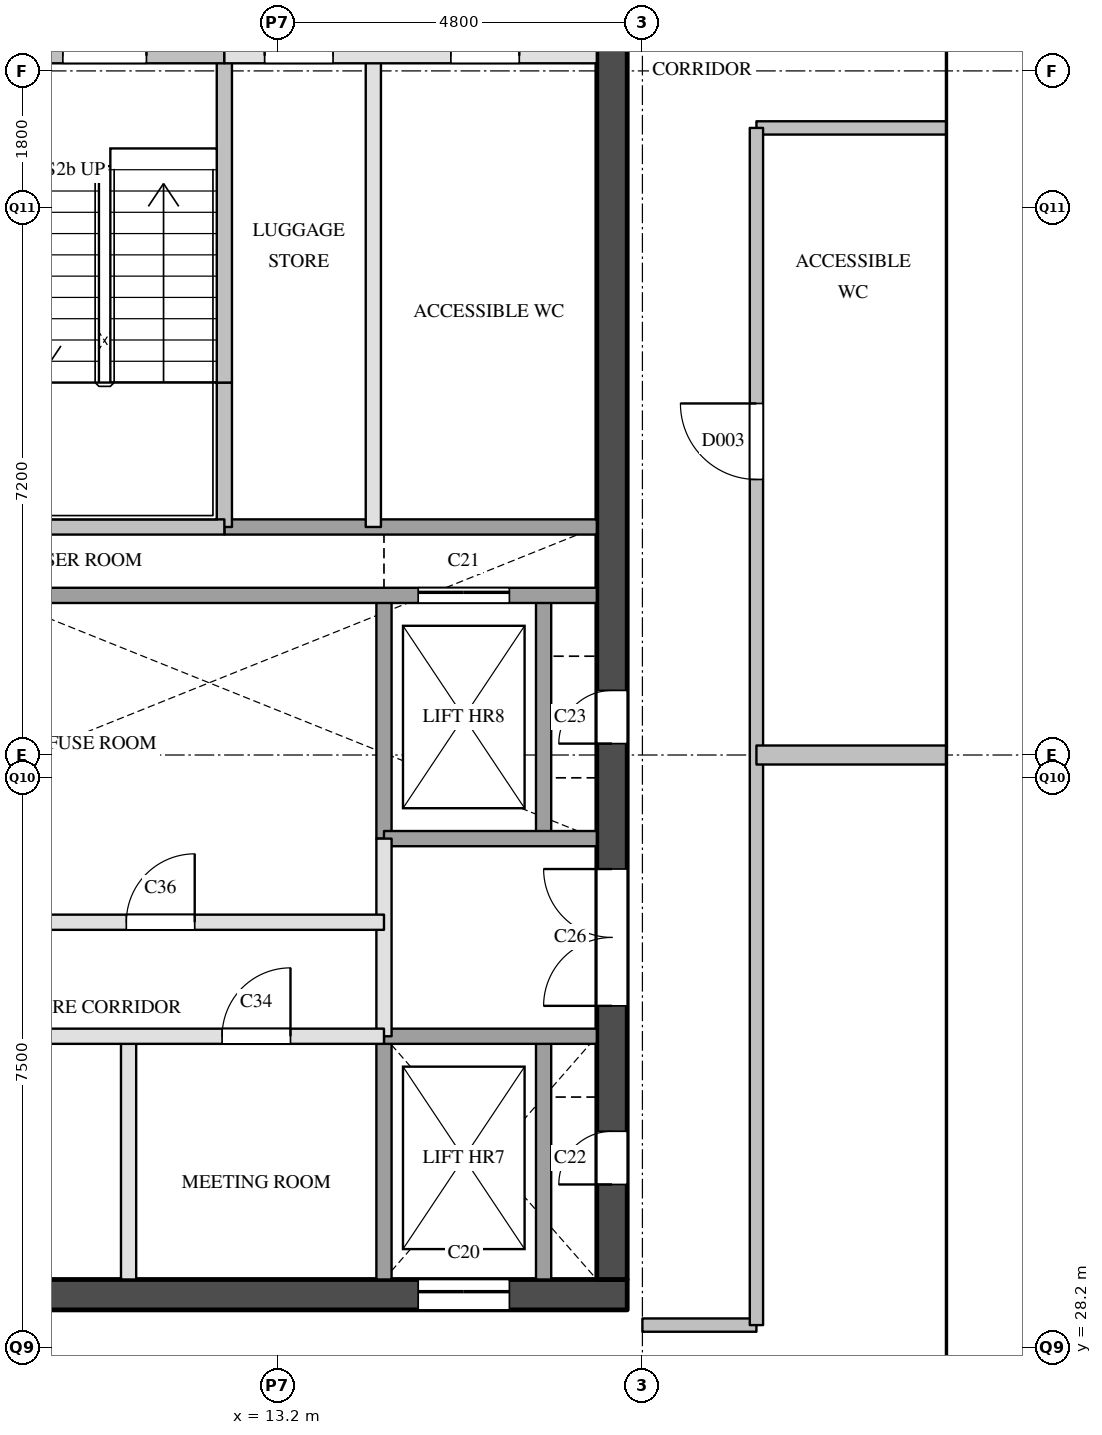
"""IFC4 building model, lengths in metres.
Left out: names, types, materials, properties, quantities, classifications, styles, units other than length and angle.
Written with IfcOpenShell. Run it as: python <this file> out.ifc"""

import sys

from ifc_helpers import new_model, si_unit, direction, frame, frame_2d, origin, place, context, subcontext, project, spatial, rectangle, extrude, element, fill, save


model = new_model("IFC4")
c1 = context("Model", 3, precision=1e-05, world=origin(), true_north=direction((0.0, 1.0)))
c2 = subcontext(c1, "Body", "Model", "MODEL_VIEW")
j1 = project(units=[si_unit("LENGTHUNIT", "METRE"), si_unit("PLANEANGLEUNIT", "RADIAN")], contexts=[c1])
p1 = place(None, origin())
s1 = spatial("IfcSite", under=j1, at=p1, CompositionType="ELEMENT")
p2 = place(p1, origin())
s2 = spatial("IfcBuilding", under=s1, at=p2, CompositionType="ELEMENT")
p3 = place(p2, frame((0.0, 0.0, 215.0)))
s3 = spatial("IfcBuildingStorey", under=s2, at=p3, CompositionType="ELEMENT", Elevation=215.0)
p4 = place(p3, frame((5.8, 28.9, 0.0), z_axis=(0.0, 0.0, 1.0), x_axis=(1.0, 0.0, 0.0)))
e1 = element("IfcWall", 1, at=p4, inside=s3, PredefinedType="SHEAR", context=c2, shape_type="SweptSolid", body=[
    extrude(rectangle(XDim=12.0, YDim=0.4, at=frame_2d((6.0, 0.0))), origin(), (0.0, 0.0, 1.0), 3.6),
])
p5 = place(p4, frame((9.25, 0.0, 0.0)))
e2 = element("IfcOpeningElement", 2, at=p5, cuts=e1, PredefinedType="OPENING", context=c2, shape_type="SweptSolid", body=[
    extrude(rectangle(XDim=1.2, YDim=2.1, at=frame_2d((0.6, 1.05))), frame((0.0, 0.21, 0.0), z_axis=(0.0, -1.0, 0.0), x_axis=(1.0, 0.0, 0.0)), (0.0, 0.0, 1.0), 0.42),
])
p6 = place(p3, frame((17.6, 29.1, 0.0), z_axis=(0.0, 0.0, 1.0), x_axis=(0.0, 1.0, 0.0)))
e3 = element("IfcWall", 3, at=p6, inside=s3, PredefinedType="SHEAR", context=c2, shape_type="SweptSolid", body=[
    extrude(rectangle(XDim=20.3, YDim=0.4, at=frame_2d((10.15, 0.0))), origin(), (0.0, 0.0, 1.0), 3.6),
])
p7 = place(p6, frame((1.25, 0.0, 0.0)))
e4 = element("IfcOpeningElement", 4, at=p7, cuts=e3, PredefinedType="OPENING", context=c2, shape_type="SweptSolid", body=[
    extrude(rectangle(XDim=0.7, YDim=2.1, at=frame_2d((0.35, 1.05))), frame((0.0, 0.21, 0.0), z_axis=(0.0, -1.0, 0.0), x_axis=(1.0, 0.0, 0.0)), (0.0, 0.0, 1.0), 0.42),
])
p8 = place(p6, frame((7.05, 0.0, 0.0)))
e5 = element("IfcOpeningElement", 5, at=p8, cuts=e3, PredefinedType="OPENING", context=c2, shape_type="SweptSolid", body=[
    extrude(rectangle(XDim=0.7, YDim=2.1, at=frame_2d((0.35, 1.05))), frame((0.0, 0.21, 0.0), z_axis=(0.0, -1.0, 0.0), x_axis=(1.0, 0.0, 0.0)), (0.0, 0.0, 1.0), 0.42),
])
p9 = place(p6, frame((3.6, 0.0, 0.0)))
e6 = element("IfcOpeningElement", 6, at=p9, cuts=e3, PredefinedType="OPENING", context=c2, shape_type="SweptSolid", body=[
    extrude(rectangle(XDim=1.8, YDim=2.1, at=frame_2d((0.9, 1.05))), frame((0.0, 0.21, 0.0), z_axis=(0.0, -1.0, 0.0), x_axis=(1.0, 0.0, 0.0)), (0.0, 0.0, 1.0), 0.42),
])
p10 = place(p3, frame((11.24, 29.1, 0.0), z_axis=(0.0, 0.0, 1.0), x_axis=(0.0, 1.0, 0.0)))
e7 = element("IfcWall", 7, at=p10, inside=s3, PredefinedType="PARTITIONING", context=c2, shape_type="SweptSolid", body=[
    extrude(rectangle(XDim=3.2, YDim=0.2, at=frame_2d((1.6, 0.0))), origin(), (0.0, 0.0, 1.0), 3.6),
])
p11 = place(p3, frame((12.5, 39.0, 0.0), z_axis=(0.0, 0.0, 1.0), x_axis=(0.0, 1.0, 0.0)))
e8 = element("IfcWall", 8, at=p11, inside=s3, PredefinedType="SOLIDWALL", context=c2, shape_type="SweptSolid", body=[
    extrude(rectangle(XDim=1.9, YDim=0.2, at=frame_2d((0.95, 0.0))), origin(), (0.0, 0.0, 1.0), 3.6),
])
p12 = place(p3, frame((12.5, 40.9, 0.0), z_axis=(0.0, 0.0, 1.0), x_axis=(0.0, 1.0, 0.0)))
e9 = element("IfcWall", 9, at=p12, inside=s3, PredefinedType="SOLIDWALL", context=c2, shape_type="SweptSolid", body=[
    extrude(rectangle(XDim=4.3, YDim=0.2, at=frame_2d((2.15, 0.0))), origin(), (0.0, 0.0, 1.0), 3.6),
])
p13 = place(p3, frame((14.46, 39.0, 0.0), z_axis=(0.0, 0.0, 1.0), x_axis=(0.0, 1.0, 0.0)))
e10 = element("IfcWall", 10, at=p13, inside=s3, PredefinedType="PARTITIONING", context=c2, shape_type="SweptSolid", body=[
    extrude(rectangle(XDim=6.2, YDim=0.2, at=frame_2d((3.1, 0.0))), origin(), (0.0, 0.0, 1.0), 3.6),
])
p14 = place(p3, frame((14.6, 32.3, 0.0), z_axis=(0.0, 0.0, 1.0), x_axis=(0.0, 1.0, 0.0)))
e11 = element("IfcWall", 11, at=p14, inside=s3, PredefinedType="PARTITIONING", context=c2, shape_type="SweptSolid", body=[
    extrude(rectangle(XDim=2.6, YDim=0.2, at=frame_2d((1.3, 0.0))), origin(), (0.0, 0.0, 1.0), 3.6),
])
p15 = place(p3, frame((14.6, 29.1, 0.0), z_axis=(0.0, 0.0, 1.0), x_axis=(0.0, 1.0, 0.0)))
e12 = element("IfcWall", 12, at=p15, inside=s3, PredefinedType="SOLIDWALL", context=c2, shape_type="SweptSolid", body=[
    extrude(rectangle(XDim=3.2, YDim=0.2, at=frame_2d((1.6, 0.0))), origin(), (0.0, 0.0, 1.0), 3.6),
])
p16 = place(p3, frame((14.6, 34.9, 0.0), z_axis=(0.0, 0.0, 1.0), x_axis=(0.0, 1.0, 0.0)))
e13 = element("IfcWall", 13, at=p16, inside=s3, PredefinedType="SOLIDWALL", context=c2, shape_type="SweptSolid", body=[
    extrude(rectangle(XDim=3.2, YDim=0.2, at=frame_2d((1.6, 0.0))), origin(), (0.0, 0.0, 1.0), 3.6),
])
p17 = place(p3, frame((16.7, 29.1, 0.0), z_axis=(0.0, 0.0, 1.0), x_axis=(0.0, 1.0, 0.0)))
e14 = element("IfcWall", 14, at=p17, inside=s3, PredefinedType="SOLIDWALL", context=c2, shape_type="SweptSolid", body=[
    extrude(rectangle(XDim=3.2, YDim=0.2, at=frame_2d((1.6, 0.0))), origin(), (0.0, 0.0, 1.0), 3.6),
])
p18 = place(p3, frame((16.7, 34.9, 0.0), z_axis=(0.0, 0.0, 1.0), x_axis=(0.0, 1.0, 0.0)))
e15 = element("IfcWall", 15, at=p18, inside=s3, PredefinedType="SOLIDWALL", context=c2, shape_type="SweptSolid", body=[
    extrude(rectangle(XDim=3.2, YDim=0.2, at=frame_2d((1.6, 0.0))), origin(), (0.0, 0.0, 1.0), 3.6),
])
p19 = place(p3, frame((6.2, 32.3, 0.0), z_axis=(0.0, 0.0, 1.0), x_axis=(1.0, 0.0, 0.0)))
e16 = element("IfcWall", 16, at=p19, inside=s3, PredefinedType="PARTITIONING", context=c2, shape_type="SweptSolid", body=[
    extrude(rectangle(XDim=8.4, YDim=0.2, at=frame_2d((4.2, 0.0))), origin(), (0.0, 0.0, 1.0), 3.6),
])
p20 = place(p19, frame((2.07, 0.0, 0.0)))
e17 = element("IfcOpeningElement", 17, at=p20, cuts=e16, PredefinedType="OPENING", context=c2, shape_type="SweptSolid", body=[
    extrude(rectangle(XDim=0.9, YDim=2.1, at=frame_2d((0.45, 1.05))), frame((0.0, 0.11, 0.0), z_axis=(0.0, -1.0, 0.0), x_axis=(1.0, 0.0, 0.0)), (0.0, 0.0, 1.0), 0.22),
])
p21 = place(p19, frame((6.27, 0.0, 0.0)))
e18 = element("IfcOpeningElement", 18, at=p21, cuts=e16, PredefinedType="OPENING", context=c2, shape_type="SweptSolid", body=[
    extrude(rectangle(XDim=0.9, YDim=2.1, at=frame_2d((0.45, 1.05))), frame((0.0, 0.11, 0.0), z_axis=(0.0, -1.0, 0.0), x_axis=(1.0, 0.0, 0.0)), (0.0, 0.0, 1.0), 0.22),
])
p22 = place(p3, frame((14.6, 32.3, 0.0), z_axis=(0.0, 0.0, 1.0), x_axis=(1.0, 0.0, 0.0)))
e19 = element("IfcWall", 19, at=p22, inside=s3, PredefinedType="SOLIDWALL", context=c2, shape_type="SweptSolid", body=[
    extrude(rectangle(XDim=2.8, YDim=0.2, at=frame_2d((1.4, 0.0))), origin(), (0.0, 0.0, 1.0), 3.6),
])
p23 = place(p3, frame((6.2, 33.8, 0.0), z_axis=(0.0, 0.0, 1.0), x_axis=(1.0, 0.0, 0.0)))
e20 = element("IfcWall", 20, at=p23, inside=s3, PredefinedType="PARTITIONING", context=c2, shape_type="SweptSolid", body=[
    extrude(rectangle(XDim=8.4, YDim=0.2, at=frame_2d((4.2, 0.0))), origin(), (0.0, 0.0, 1.0), 3.6),
])
p24 = place(p23, frame((0.81, 0.0, 0.0)))
e21 = element("IfcOpeningElement", 21, at=p24, cuts=e20, PredefinedType="OPENING", context=c2, shape_type="SweptSolid", body=[
    extrude(rectangle(XDim=0.9, YDim=2.1, at=frame_2d((0.45, 1.05))), frame((0.0, 0.11, 0.0), z_axis=(0.0, -1.0, 0.0), x_axis=(1.0, 0.0, 0.0)), (0.0, 0.0, 1.0), 0.22),
])
p25 = place(p23, frame((5.01, 0.0, 0.0)))
e22 = element("IfcOpeningElement", 22, at=p25, cuts=e20, PredefinedType="OPENING", context=c2, shape_type="SweptSolid", body=[
    extrude(rectangle(XDim=0.9, YDim=2.1, at=frame_2d((0.45, 1.05))), frame((0.0, 0.11, 0.0), z_axis=(0.0, -1.0, 0.0), x_axis=(1.0, 0.0, 0.0)), (0.0, 0.0, 1.0), 0.22),
])
p26 = place(p3, frame((14.6, 34.9, 0.0), z_axis=(0.0, 0.0, 1.0), x_axis=(1.0, 0.0, 0.0)))
e23 = element("IfcWall", 23, at=p26, inside=s3, PredefinedType="SOLIDWALL", context=c2, shape_type="SweptSolid", body=[
    extrude(rectangle(XDim=2.8, YDim=0.2, at=frame_2d((1.4, 0.0))), origin(), (0.0, 0.0, 1.0), 3.6),
])
p27 = place(p3, frame((6.2, 38.1, 0.0), z_axis=(0.0, 0.0, 1.0), x_axis=(1.0, 0.0, 0.0)))
e24 = element("IfcWall", 24, at=p27, inside=s3, PredefinedType="SOLIDWALL", context=c2, shape_type="SweptSolid", body=[
    extrude(rectangle(XDim=11.2, YDim=0.2, at=frame_2d((5.6, 0.0))), origin(), (0.0, 0.0, 1.0), 3.6),
])
p28 = place(p27, frame((8.85, 0.0, 0.0)))
e25 = element("IfcOpeningElement", 25, at=p28, cuts=e24, PredefinedType="OPENING", context=c2, shape_type="SweptSolid", body=[
    extrude(rectangle(XDim=1.2, YDim=2.1, at=frame_2d((0.6, 1.05))), frame((0.0, 0.11, 0.0), z_axis=(0.0, -1.0, 0.0), x_axis=(1.0, 0.0, 0.0)), (0.0, 0.0, 1.0), 0.22),
])
p29 = place(p3, frame((12.5, 39.0, 0.0), z_axis=(0.0, 0.0, 1.0), x_axis=(1.0, 0.0, 0.0)))
e26 = element("IfcWall", 26, at=p29, inside=s3, PredefinedType="SOLIDWALL", context=c2, shape_type="SweptSolid", body=[
    extrude(rectangle(XDim=4.9, YDim=0.2, at=frame_2d((2.45, 0.0))), origin(), (0.0, 0.0, 1.0), 3.6),
])
p30 = place(p3, frame((9.45, 39.0, 0.0), z_axis=(0.0, 0.0, 1.0), x_axis=(1.0, 0.0, 0.0)))
e27 = element("IfcWall", 27, at=p30, inside=s3, PredefinedType="SOLIDWALL", context=c2, shape_type="SweptSolid", body=[
    extrude(rectangle(XDim=3.05, YDim=0.2, at=frame_2d((1.525, 0.0))), origin(), (0.0, 0.0, 1.0), 3.6),
])
p31 = place(p3, frame((12.5, 45.2, 0.0), z_axis=(0.0, 0.0, 1.0), x_axis=(1.0, 0.0, 0.0)))
e28 = element("IfcWall", 28, at=p31, inside=s3, PredefinedType="PARTITIONING", context=c2, shape_type="SweptSolid", body=[
    extrude(rectangle(XDim=4.9, YDim=0.2, at=frame_2d((2.45, 0.0))), origin(), (0.0, 0.0, 1.0), 3.6),
])
p32 = place(p31, frame((0.53, 0.0, 0.0)))
e29 = element("IfcOpeningElement", 29, at=p32, cuts=e28, PredefinedType="OPENING", context=c2, shape_type="SweptSolid", body=[
    extrude(rectangle(XDim=0.9, YDim=2.1, at=frame_2d((0.45, 1.05))), frame((0.0, 0.11, 0.0), z_axis=(0.0, -1.0, 0.0), x_axis=(1.0, 0.0, 0.0)), (0.0, 0.0, 1.0), 0.22),
])
p33 = place(p31, frame((2.98, 0.0, 0.0)))
e30 = element("IfcOpeningElement", 30, at=p33, cuts=e28, PredefinedType="OPENING", context=c2, shape_type="SweptSolid", body=[
    extrude(rectangle(XDim=0.9, YDim=2.1, at=frame_2d((0.45, 1.05))), frame((0.0, 0.11, 0.0), z_axis=(0.0, -1.0, 0.0), x_axis=(1.0, 0.0, 0.0)), (0.0, 0.0, 1.0), 0.22),
])
p34 = place(p3, frame((6.2, 45.2, 0.0), z_axis=(0.0, 0.0, 1.0), x_axis=(1.0, 0.0, 0.0)))
e31 = element("IfcWall", 31, at=p34, inside=s3, PredefinedType="SOLIDWALL", context=c2, shape_type="SweptSolid", body=[
    extrude(rectangle(XDim=6.3, YDim=0.2, at=frame_2d((3.15, 0.0))), origin(), (0.0, 0.0, 1.0), 3.6),
])
p35 = place(p34, frame((1.025, 0.0, 0.0)))
e32 = element("IfcOpeningElement", 32, at=p35, cuts=e31, PredefinedType="OPENING", context=c2, shape_type="SweptSolid", body=[
    extrude(rectangle(XDim=1.1, YDim=2.1, at=frame_2d((0.55, 1.05))), frame((0.0, 0.11, 0.0), z_axis=(0.0, -1.0, 0.0), x_axis=(1.0, 0.0, 0.0)), (0.0, 0.0, 1.0), 0.22),
])
p36 = place(p34, frame((4.175, 0.0, 0.0)))
e33 = element("IfcOpeningElement", 33, at=p36, cuts=e31, PredefinedType="OPENING", context=c2, shape_type="SweptSolid", body=[
    extrude(rectangle(XDim=1.1, YDim=2.1, at=frame_2d((0.55, 1.05))), frame((0.0, 0.11, 0.0), z_axis=(0.0, -1.0, 0.0), x_axis=(1.0, 0.0, 0.0)), (0.0, 0.0, 1.0), 0.22),
])
p37 = place(p3, frame((18.0, 28.5, 0.0), z_axis=(0.0, 0.0, 1.0), x_axis=(1.0, 0.0, 0.0)))
e34 = element("IfcWall", 34, at=p37, inside=s3, PredefinedType="PARTITIONING", context=c2, shape_type="SweptSolid", body=[
    extrude(rectangle(XDim=1.5, YDim=0.175, at=frame_2d((0.75, 0.0))), origin(), (0.0, 0.0, 1.0), 3.6),
])
p38 = place(p3, frame((19.5, 44.25, 0.0), z_axis=(0.0, 0.0, 1.0), x_axis=(1.0, 0.0, 0.0)))
e35 = element("IfcWall", 35, at=p38, inside=s3, PredefinedType="PARTITIONING", context=c2, shape_type="SweptSolid", body=[
    extrude(rectangle(XDim=2.5, YDim=0.175, at=frame_2d((1.25, 0.0))), origin(), (0.0, 0.0, 1.0), 3.6),
])
p39 = place(p3, frame((19.5, 28.5, 0.0), z_axis=(0.0, 0.0, 1.0), x_axis=(0.0, 1.0, 0.0)))
e36 = element("IfcWall", 36, at=p39, inside=s3, PredefinedType="PARTITIONING", context=c2, shape_type="SweptSolid", body=[
    extrude(rectangle(XDim=15.75, YDim=0.175, at=frame_2d((7.875, 0.0))), origin(), (0.0, 0.0, 1.0), 3.6),
])
p40 = place(p39, frame((11.125, 0.0, 0.0)))
e37 = element("IfcOpeningElement", 37, at=p40, cuts=e36, PredefinedType="OPENING", context=c2, shape_type="SweptSolid", body=[
    extrude(rectangle(XDim=1.0, YDim=2.1, at=frame_2d((0.5, 1.05))), frame((0.0, 0.097, 0.0), z_axis=(0.0, -1.0, 0.0), x_axis=(1.0, 0.0, 0.0)), (0.0, 0.0, 1.0), 0.195),
])
p41 = place(p3, frame((19.5, 36.0, 0.0), z_axis=(0.0, 0.0, 1.0), x_axis=(1.0, 0.0, 0.0)))
e38 = element("IfcWall", 38, at=p41, inside=s3, PredefinedType="PARTITIONING", context=c2, shape_type="SweptSolid", body=[
    extrude(rectangle(XDim=2.5, YDim=0.25, at=frame_2d((1.25, 0.0))), origin(), (0.0, 0.0, 1.0), 3.6),
])
p42 = place(p5, origin())
e39 = element("IfcDoor", 39, at=p42, inside=s3, OperationType="SLIDING_TO_LEFT", PredefinedType="DOOR", context=c2, shape_type="SweptSolid", body=[
    extrude(rectangle(XDim=1.2, YDim=2.1, at=frame_2d((0.6, 1.05))), frame((0.0, 0.025, 0.0), z_axis=(0.0, -1.0, 0.0), x_axis=(1.0, 0.0, 0.0)), (0.0, 0.0, 1.0), 0.05),
])
fill(e2, e39)
p43 = place(p28, origin())
e40 = element("IfcDoor", 40, at=p43, inside=s3, OperationType="SLIDING_TO_LEFT", PredefinedType="DOOR", context=c2, shape_type="SweptSolid", body=[
    extrude(rectangle(XDim=1.2, YDim=2.1, at=frame_2d((0.6, 1.05))), frame((0.0, 0.025, 0.0), z_axis=(0.0, -1.0, 0.0), x_axis=(1.0, 0.0, 0.0)), (0.0, 0.0, 1.0), 0.05),
])
fill(e25, e40)
p44 = place(p7, origin())
e41 = element("IfcDoor", 41, at=p44, inside=s3, OperationType="SINGLE_SWING_LEFT", PredefinedType="DOOR", context=c2, shape_type="SweptSolid", body=[
    extrude(rectangle(XDim=0.7, YDim=2.1, at=frame_2d((0.35, 1.05))), frame((0.0, 0.025, 0.0), z_axis=(0.0, -1.0, 0.0), x_axis=(1.0, 0.0, 0.0)), (0.0, 0.0, 1.0), 0.05),
])
fill(e4, e41)
p45 = place(p8, origin())
e42 = element("IfcDoor", 42, at=p45, inside=s3, OperationType="SINGLE_SWING_LEFT", PredefinedType="DOOR", context=c2, shape_type="SweptSolid", body=[
    extrude(rectangle(XDim=0.7, YDim=2.1, at=frame_2d((0.35, 1.05))), frame((0.0, 0.025, 0.0), z_axis=(0.0, -1.0, 0.0), x_axis=(1.0, 0.0, 0.0)), (0.0, 0.0, 1.0), 0.05),
])
fill(e5, e42)
p46 = place(p36, origin())
e43 = element("IfcDoor", 43, at=p46, inside=s3, OperationType="SINGLE_SWING_RIGHT", PredefinedType="DOOR", context=c2, shape_type="SweptSolid", body=[
    extrude(rectangle(XDim=1.1, YDim=2.1, at=frame_2d((0.55, 1.05))), frame((0.0, 0.025, 0.0), z_axis=(0.0, -1.0, 0.0), x_axis=(1.0, 0.0, 0.0)), (0.0, 0.0, 1.0), 0.05),
])
fill(e33, e43)
p47 = place(p9, origin())
e44 = element("IfcDoor", 44, at=p47, inside=s3, OperationType="DOUBLE_DOOR_SINGLE_SWING", PredefinedType="DOOR", context=c2, shape_type="SweptSolid", body=[
    extrude(rectangle(XDim=1.8, YDim=2.1, at=frame_2d((0.9, 1.05))), frame((0.0, 0.025, 0.0), z_axis=(0.0, -1.0, 0.0), x_axis=(1.0, 0.0, 0.0)), (0.0, 0.0, 1.0), 0.05),
])
fill(e6, e44)
p48 = place(p32, origin())
e45 = element("IfcDoor", 45, at=p48, inside=s3, OperationType="SINGLE_SWING_LEFT", PredefinedType="DOOR", context=c2, shape_type="SweptSolid", body=[
    extrude(rectangle(XDim=0.9, YDim=2.1, at=frame_2d((0.45, 1.05))), frame((0.0, 0.025, 0.0), z_axis=(0.0, -1.0, 0.0), x_axis=(1.0, 0.0, 0.0)), (0.0, 0.0, 1.0), 0.05),
])
fill(e29, e45)
p49 = place(p33, origin())
e46 = element("IfcDoor", 46, at=p49, inside=s3, OperationType="SINGLE_SWING_RIGHT", PredefinedType="DOOR", context=c2, shape_type="SweptSolid", body=[
    extrude(rectangle(XDim=0.9, YDim=2.1, at=frame_2d((0.45, 1.05))), frame((0.0, 0.025, 0.0), z_axis=(0.0, -1.0, 0.0), x_axis=(1.0, 0.0, 0.0)), (0.0, 0.0, 1.0), 0.05),
])
fill(e30, e46)
p50 = place(p21, origin())
e47 = element("IfcDoor", 47, at=p50, inside=s3, OperationType="SINGLE_SWING_RIGHT", PredefinedType="DOOR", context=c2, shape_type="SweptSolid", body=[
    extrude(rectangle(XDim=0.9, YDim=2.1, at=frame_2d((0.45, 1.05))), frame((0.0, 0.025, 0.0), z_axis=(0.0, -1.0, 0.0), x_axis=(1.0, 0.0, 0.0)), (0.0, 0.0, 1.0), 0.05),
])
fill(e18, e47)
p51 = place(p25, origin())
e48 = element("IfcDoor", 48, at=p51, inside=s3, OperationType="SINGLE_SWING_RIGHT", PredefinedType="DOOR", context=c2, shape_type="SweptSolid", body=[
    extrude(rectangle(XDim=0.9, YDim=2.1, at=frame_2d((0.45, 1.05))), frame((0.0, 0.025, 0.0), z_axis=(0.0, -1.0, 0.0), x_axis=(1.0, 0.0, 0.0)), (0.0, 0.0, 1.0), 0.05),
])
fill(e22, e48)
p52 = place(p40, origin())
e49 = element("IfcDoor", 49, at=p52, inside=s3, OperationType="SINGLE_SWING_RIGHT", PredefinedType="DOOR", context=c2, shape_type="SweptSolid", body=[
    extrude(rectangle(XDim=1.0, YDim=2.1, at=frame_2d((0.5, 1.05))), frame((0.0, 0.025, 0.0), z_axis=(0.0, -1.0, 0.0), x_axis=(1.0, 0.0, 0.0)), (0.0, 0.0, 1.0), 0.05),
])
fill(e37, e49)
save(model, sys.argv[1])
